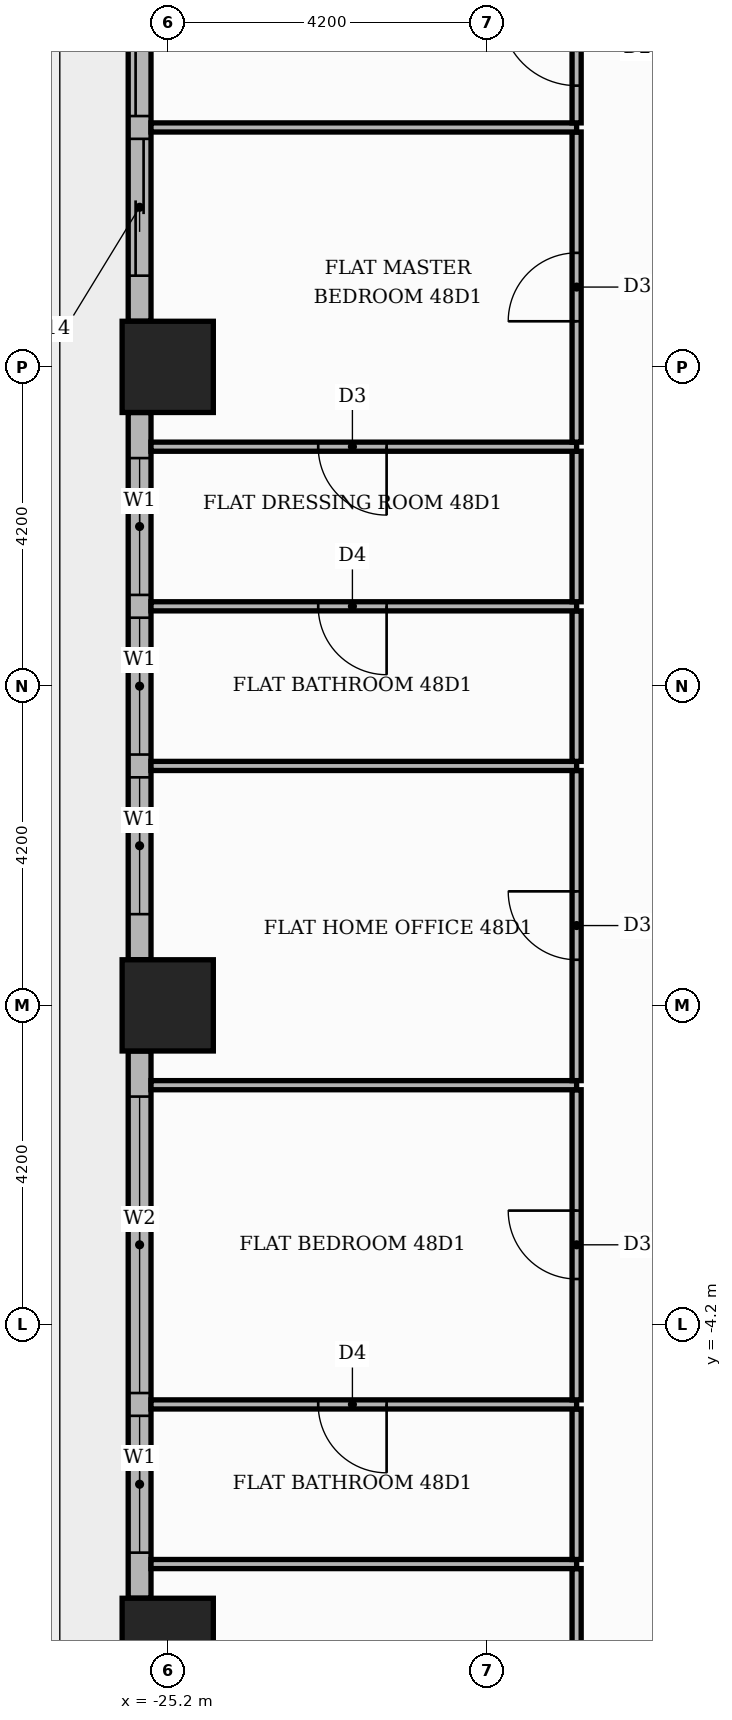
"""IFC4 building model, lengths in metres.
Left out: names, types, materials, properties, quantities, classifications, styles, units other than length and angle.
Written with IfcOpenShell. Run it as: python <this file> out.ifc"""

import sys

from ifc_helpers import new_model, si_unit, direction, frame, frame_2d, origin, origin_2d, place, context, subcontext, project, spatial, rectangle, extrude, element, fill, save


model = new_model("IFC4")
c1 = context("Model", 3, precision=1e-05, world=origin(), true_north=direction((0.0, 1.0)))
c2 = subcontext(c1, "Body", "Model", "MODEL_VIEW")
j1 = project(units=[si_unit("LENGTHUNIT", "METRE"), si_unit("PLANEANGLEUNIT", "RADIAN")], contexts=[c1])
p1 = place(None, origin())
s1 = spatial("IfcSite", under=j1, at=p1, CompositionType="ELEMENT")
p2 = place(p1, origin())
s2 = spatial("IfcBuilding", under=s1, at=p2, CompositionType="ELEMENT")
p3 = place(p2, frame((0.0, 0.0, 204.0)))
s3 = spatial("IfcBuildingStorey", under=s2, at=p3, CompositionType="ELEMENT", Elevation=204.0)
for number, where, z_axis, x_axis in (
    (1, (-25.2, 0.0, 0.0), (0.0, 0.0, 1.0), (1.0, 0.0, 0.0)),
    (2, (-25.2, -8.4, 0.0), (0.0, 0.0, 1.0), (1.0, 0.0, 0.0)),
    (3, (-25.2, 8.4, 0.0), (0.0, 0.0, 1.0), (1.0, 0.0, 0.0)),
):
    element("IfcColumn", number, at=place(p3, frame(where, z_axis=z_axis, x_axis=x_axis)), inside=s3, PredefinedType="COLUMN", context=c2, shape_type="SweptSolid", body=[
        extrude(rectangle(XDim=1.2, YDim=1.2, at=origin_2d()), origin(), (0.0, 0.0, 1.0), 3.9),
    ])
p4 = place(p3, frame((-25.57, 16.2, 0.0), z_axis=(0.0, 0.0, 1.0), x_axis=(0.0, -1.0, 0.0)))
e4 = element("IfcWall", 4, at=p4, inside=s3, PredefinedType="STANDARD", context=c2, shape_type="SweptSolid", body=[
    extrude(rectangle(XDim=7.2, YDim=0.3, at=frame_2d((3.6, 0.0))), origin(), (0.0, 0.0, 1.0), 3.48),
])
p5 = place(p4, frame((0.6, 0.0, 0.0)))
e5 = element("IfcOpeningElement", 5, at=p5, cuts=e4, PredefinedType="OPENING", context=c2, shape_type="SweptSolid", body=[
    extrude(rectangle(XDim=3.9, YDim=2.4, at=frame_2d((1.95, 1.2))), frame((0.0, 0.16, 0.0), z_axis=(0.0, -1.0, 0.0), x_axis=(1.0, 0.0, 0.0)), (0.0, 0.0, 1.0), 0.32),
])
p6 = place(p4, frame((4.8, 0.0, 0.0)))
e6 = element("IfcOpeningElement", 6, at=p6, cuts=e4, PredefinedType="OPENING", context=c2, shape_type="SweptSolid", body=[
    extrude(rectangle(XDim=1.8, YDim=2.4, at=frame_2d((0.9, 1.2))), frame((0.0, 0.16, 0.0), z_axis=(0.0, -1.0, 0.0), x_axis=(1.0, 0.0, 0.0)), (0.0, 0.0, 1.0), 0.32),
])
p7 = place(p3, frame((-25.57, 7.8, 0.0), z_axis=(0.0, 0.0, 1.0), x_axis=(0.0, -1.0, 0.0)))
e7 = element("IfcWall", 7, at=p7, inside=s3, PredefinedType="STANDARD", context=c2, shape_type="SweptSolid", body=[
    extrude(rectangle(XDim=7.2, YDim=0.3, at=frame_2d((3.6, 0.0))), origin(), (0.0, 0.0, 1.0), 3.48),
])
p8 = place(p7, frame((0.6, 0.0, 0.9)))
e8 = element("IfcOpeningElement", 8, at=p8, cuts=e7, PredefinedType="OPENING", context=c2, shape_type="SweptSolid", body=[
    extrude(rectangle(XDim=1.8, YDim=2.1, at=frame_2d((0.9, 1.05))), frame((0.0, 0.16, 0.0), z_axis=(0.0, -1.0, 0.0), x_axis=(1.0, 0.0, 0.0)), (0.0, 0.0, 1.0), 0.32),
])
p9 = place(p7, frame((2.7, 0.0, 0.9)))
e9 = element("IfcOpeningElement", 9, at=p9, cuts=e7, PredefinedType="OPENING", context=c2, shape_type="SweptSolid", body=[
    extrude(rectangle(XDim=1.8, YDim=2.1, at=frame_2d((0.9, 1.05))), frame((0.0, 0.16, 0.0), z_axis=(0.0, -1.0, 0.0), x_axis=(1.0, 0.0, 0.0)), (0.0, 0.0, 1.0), 0.32),
])
p10 = place(p7, frame((4.8, 0.0, 0.9)))
e10 = element("IfcOpeningElement", 10, at=p10, cuts=e7, PredefinedType="OPENING", context=c2, shape_type="SweptSolid", body=[
    extrude(rectangle(XDim=1.8, YDim=2.1, at=frame_2d((0.9, 1.05))), frame((0.0, 0.16, 0.0), z_axis=(0.0, -1.0, 0.0), x_axis=(1.0, 0.0, 0.0)), (0.0, 0.0, 1.0), 0.32),
])
p11 = place(p3, frame((-25.57, -0.6, 0.0), z_axis=(0.0, 0.0, 1.0), x_axis=(0.0, -1.0, 0.0)))
e11 = element("IfcWall", 11, at=p11, inside=s3, PredefinedType="STANDARD", context=c2, shape_type="SweptSolid", body=[
    extrude(rectangle(XDim=7.2, YDim=0.3, at=frame_2d((3.6, 0.0))), origin(), (0.0, 0.0, 1.0), 3.48),
])
p12 = place(p11, frame((0.6, 0.0, 0.9)))
e12 = element("IfcOpeningElement", 12, at=p12, cuts=e11, PredefinedType="OPENING", context=c2, shape_type="SweptSolid", body=[
    extrude(rectangle(XDim=3.9, YDim=2.1, at=frame_2d((1.95, 1.05))), frame((0.0, 0.16, 0.0), z_axis=(0.0, -1.0, 0.0), x_axis=(1.0, 0.0, 0.0)), (0.0, 0.0, 1.0), 0.32),
])
p13 = place(p11, frame((4.8, 0.0, 0.9)))
e13 = element("IfcOpeningElement", 13, at=p13, cuts=e11, PredefinedType="OPENING", context=c2, shape_type="SweptSolid", body=[
    extrude(rectangle(XDim=1.8, YDim=2.1, at=frame_2d((0.9, 1.05))), frame((0.0, 0.16, 0.0), z_axis=(0.0, -1.0, 0.0), x_axis=(1.0, 0.0, 0.0)), (0.0, 0.0, 1.0), 0.32),
])
p14 = place(p3, frame((-19.82, -11.49, 0.0), z_axis=(0.0, 0.0, 1.0), x_axis=(0.0, 1.0, 0.0)))
e14 = element("IfcWall", 14, at=p14, inside=s3, PredefinedType="PARTITIONING", context=c2, shape_type="SweptSolid", body=[
    extrude(rectangle(XDim=4.08, YDim=0.12, at=frame_2d((2.04, 0.0))), origin(), (0.0, 0.0, 1.0), 3.48),
])
p15 = place(p14, frame((1.59, 0.0, 0.0)))
e15 = element("IfcOpeningElement", 15, at=p15, cuts=e14, PredefinedType="OPENING", context=c2, shape_type="SweptSolid", body=[
    extrude(rectangle(XDim=0.9, YDim=2.1, at=frame_2d((0.45, 1.05))), frame((0.0, 0.07, 0.0), z_axis=(0.0, -1.0, 0.0), x_axis=(1.0, 0.0, 0.0)), (0.0, 0.0, 1.0), 0.14),
])
p16 = place(p3, frame((-25.42, -7.35, 0.0), z_axis=(0.0, 0.0, 1.0), x_axis=(1.0, 0.0, 0.0)))
e16 = element("IfcWall", 16, at=p16, inside=s3, PredefinedType="PARTITIONING", context=c2, shape_type="SweptSolid", body=[
    extrude(rectangle(XDim=5.6, YDim=0.12, at=frame_2d((2.8, 0.0))), origin(), (0.0, 0.0, 1.0), 3.48),
])
p17 = place(p3, frame((-19.82, -7.29, 0.0), z_axis=(0.0, 0.0, 1.0), x_axis=(0.0, 1.0, 0.0)))
e17 = element("IfcWall", 17, at=p17, inside=s3, PredefinedType="PARTITIONING", context=c2, shape_type="SweptSolid", body=[
    extrude(rectangle(XDim=1.98, YDim=0.12, at=frame_2d((0.99, 0.0))), origin(), (0.0, 0.0, 1.0), 3.48),
])
p18 = place(p3, frame((-25.42, -5.25, 0.0), z_axis=(0.0, 0.0, 1.0), x_axis=(1.0, 0.0, 0.0)))
e18 = element("IfcWall", 18, at=p18, inside=s3, PredefinedType="PARTITIONING", context=c2, shape_type="SweptSolid", body=[
    extrude(rectangle(XDim=5.6, YDim=0.12, at=frame_2d((2.8, 0.0))), origin(), (0.0, 0.0, 1.0), 3.48),
])
p19 = place(p18, frame((2.2, 0.0, 0.0)))
e19 = element("IfcOpeningElement", 19, at=p19, cuts=e18, PredefinedType="OPENING", context=c2, shape_type="SweptSolid", body=[
    extrude(rectangle(XDim=0.9, YDim=2.1, at=frame_2d((0.45, 1.05))), frame((0.0, 0.07, 0.0), z_axis=(0.0, -1.0, 0.0), x_axis=(1.0, 0.0, 0.0)), (0.0, 0.0, 1.0), 0.14),
])
p20 = place(p3, frame((-19.82, -5.19, 0.0), z_axis=(0.0, 0.0, 1.0), x_axis=(0.0, 1.0, 0.0)))
e20 = element("IfcWall", 20, at=p20, inside=s3, PredefinedType="PARTITIONING", context=c2, shape_type="SweptSolid", body=[
    extrude(rectangle(XDim=4.08, YDim=0.12, at=frame_2d((2.04, 0.0))), origin(), (0.0, 0.0, 1.0), 3.48),
])
p21 = place(p20, frame((1.59, 0.0, 0.0)))
e21 = element("IfcOpeningElement", 21, at=p21, cuts=e20, PredefinedType="OPENING", context=c2, shape_type="SweptSolid", body=[
    extrude(rectangle(XDim=0.9, YDim=2.1, at=frame_2d((0.45, 1.05))), frame((0.0, 0.07, 0.0), z_axis=(0.0, -1.0, 0.0), x_axis=(1.0, 0.0, 0.0)), (0.0, 0.0, 1.0), 0.14),
])
p22 = place(p3, frame((-25.42, -1.05, 0.0), z_axis=(0.0, 0.0, 1.0), x_axis=(1.0, 0.0, 0.0)))
e22 = element("IfcWall", 22, at=p22, inside=s3, PredefinedType="PARTITIONING", context=c2, shape_type="SweptSolid", body=[
    extrude(rectangle(XDim=5.6, YDim=0.12, at=frame_2d((2.8, 0.0))), origin(), (0.0, 0.0, 1.0), 3.48),
])
p23 = place(p3, frame((-19.82, -0.99, 0.0), z_axis=(0.0, 0.0, 1.0), x_axis=(0.0, 1.0, 0.0)))
e23 = element("IfcWall", 23, at=p23, inside=s3, PredefinedType="PARTITIONING", context=c2, shape_type="SweptSolid", body=[
    extrude(rectangle(XDim=4.08, YDim=0.12, at=frame_2d((2.04, 0.0))), origin(), (0.0, 0.0, 1.0), 3.48),
])
p24 = place(p23, frame((1.59, 0.0, 0.0)))
e24 = element("IfcOpeningElement", 24, at=p24, cuts=e23, PredefinedType="OPENING", context=c2, shape_type="SweptSolid", body=[
    extrude(rectangle(XDim=0.9, YDim=2.1, at=frame_2d((0.45, 1.05))), frame((0.0, 0.07, 0.0), z_axis=(0.0, -1.0, 0.0), x_axis=(1.0, 0.0, 0.0)), (0.0, 0.0, 1.0), 0.14),
])
p25 = place(p3, frame((-25.42, 3.15, 0.0), z_axis=(0.0, 0.0, 1.0), x_axis=(1.0, 0.0, 0.0)))
e25 = element("IfcWall", 25, at=p25, inside=s3, PredefinedType="PARTITIONING", context=c2, shape_type="SweptSolid", body=[
    extrude(rectangle(XDim=5.6, YDim=0.12, at=frame_2d((2.8, 0.0))), origin(), (0.0, 0.0, 1.0), 3.48),
])
p26 = place(p3, frame((-19.82, 3.21, 0.0), z_axis=(0.0, 0.0, 1.0), x_axis=(0.0, 1.0, 0.0)))
e26 = element("IfcWall", 26, at=p26, inside=s3, PredefinedType="PARTITIONING", context=c2, shape_type="SweptSolid", body=[
    extrude(rectangle(XDim=1.98, YDim=0.12, at=frame_2d((0.99, 0.0))), origin(), (0.0, 0.0, 1.0), 3.48),
])
p27 = place(p3, frame((-25.42, 5.25, 0.0), z_axis=(0.0, 0.0, 1.0), x_axis=(1.0, 0.0, 0.0)))
e27 = element("IfcWall", 27, at=p27, inside=s3, PredefinedType="PARTITIONING", context=c2, shape_type="SweptSolid", body=[
    extrude(rectangle(XDim=5.6, YDim=0.12, at=frame_2d((2.8, 0.0))), origin(), (0.0, 0.0, 1.0), 3.48),
])
p28 = place(p27, frame((2.2, 0.0, 0.0)))
e28 = element("IfcOpeningElement", 28, at=p28, cuts=e27, PredefinedType="OPENING", context=c2, shape_type="SweptSolid", body=[
    extrude(rectangle(XDim=0.9, YDim=2.1, at=frame_2d((0.45, 1.05))), frame((0.0, 0.07, 0.0), z_axis=(0.0, -1.0, 0.0), x_axis=(1.0, 0.0, 0.0)), (0.0, 0.0, 1.0), 0.14),
])
p29 = place(p3, frame((-19.82, 5.31, 0.0), z_axis=(0.0, 0.0, 1.0), x_axis=(0.0, 1.0, 0.0)))
e29 = element("IfcWall", 29, at=p29, inside=s3, PredefinedType="PARTITIONING", context=c2, shape_type="SweptSolid", body=[
    extrude(rectangle(XDim=1.98, YDim=0.12, at=frame_2d((0.99, 0.0))), origin(), (0.0, 0.0, 1.0), 3.48),
])
p30 = place(p3, frame((-25.42, 7.35, 0.0), z_axis=(0.0, 0.0, 1.0), x_axis=(1.0, 0.0, 0.0)))
e30 = element("IfcWall", 30, at=p30, inside=s3, PredefinedType="PARTITIONING", context=c2, shape_type="SweptSolid", body=[
    extrude(rectangle(XDim=5.6, YDim=0.12, at=frame_2d((2.8, 0.0))), origin(), (0.0, 0.0, 1.0), 3.48),
])
p31 = place(p30, frame((2.2, 0.0, 0.0)))
e31 = element("IfcOpeningElement", 31, at=p31, cuts=e30, PredefinedType="OPENING", context=c2, shape_type="SweptSolid", body=[
    extrude(rectangle(XDim=0.9, YDim=2.1, at=frame_2d((0.45, 1.05))), frame((0.0, 0.07, 0.0), z_axis=(0.0, -1.0, 0.0), x_axis=(1.0, 0.0, 0.0)), (0.0, 0.0, 1.0), 0.14),
])
p32 = place(p3, frame((-19.82, 7.41, 0.0), z_axis=(0.0, 0.0, 1.0), x_axis=(0.0, 1.0, 0.0)))
e32 = element("IfcWall", 32, at=p32, inside=s3, PredefinedType="PARTITIONING", context=c2, shape_type="SweptSolid", body=[
    extrude(rectangle(XDim=4.08, YDim=0.12, at=frame_2d((2.04, 0.0))), origin(), (0.0, 0.0, 1.0), 3.48),
])
p33 = place(p32, frame((1.59, 0.0, 0.0)))
e33 = element("IfcOpeningElement", 33, at=p33, cuts=e32, PredefinedType="OPENING", context=c2, shape_type="SweptSolid", body=[
    extrude(rectangle(XDim=0.9, YDim=2.1, at=frame_2d((0.45, 1.05))), frame((0.0, 0.07, 0.0), z_axis=(0.0, -1.0, 0.0), x_axis=(1.0, 0.0, 0.0)), (0.0, 0.0, 1.0), 0.14),
])
p34 = place(p3, frame((-25.42, 11.55, 0.0), z_axis=(0.0, 0.0, 1.0), x_axis=(1.0, 0.0, 0.0)))
e34 = element("IfcWall", 34, at=p34, inside=s3, PredefinedType="PARTITIONING", context=c2, shape_type="SweptSolid", body=[
    extrude(rectangle(XDim=5.6, YDim=0.12, at=frame_2d((2.8, 0.0))), origin(), (0.0, 0.0, 1.0), 3.48),
])
p35 = place(p3, frame((-19.82, 11.61, 0.0), z_axis=(0.0, 0.0, 1.0), x_axis=(0.0, 1.0, 0.0)))
e35 = element("IfcWall", 35, at=p35, inside=s3, PredefinedType="PARTITIONING", context=c2, shape_type="SweptSolid", body=[
    extrude(rectangle(XDim=1.98, YDim=0.12, at=frame_2d((0.99, 0.0))), origin(), (0.0, 0.0, 1.0), 3.48),
])
p36 = place(p35, frame((0.49, 0.0, 0.0)))
e36 = element("IfcOpeningElement", 36, at=p36, cuts=e35, PredefinedType="OPENING", context=c2, shape_type="SweptSolid", body=[
    extrude(rectangle(XDim=1.0, YDim=2.1, at=frame_2d((0.5, 1.05))), frame((0.0, 0.07, 0.0), z_axis=(0.0, -1.0, 0.0), x_axis=(1.0, 0.0, 0.0)), (0.0, 0.0, 1.0), 0.14),
])
p37 = place(p5, origin())
e37 = element("IfcDoor", 37, at=p37, inside=s3, OperationType="SLIDING_TO_LEFT", PredefinedType="DOOR", context=c2, shape_type="SweptSolid", body=[
    extrude(rectangle(XDim=3.9, YDim=2.4, at=frame_2d((1.95, 1.2))), frame((0.0, 0.025, 0.0), z_axis=(0.0, -1.0, 0.0), x_axis=(1.0, 0.0, 0.0)), (0.0, 0.0, 1.0), 0.05),
])
fill(e5, e37)
p38 = place(p6, origin())
e38 = element("IfcDoor", 38, at=p38, inside=s3, OperationType="SLIDING_TO_RIGHT", PredefinedType="DOOR", context=c2, shape_type="SweptSolid", body=[
    extrude(rectangle(XDim=1.8, YDim=2.4, at=frame_2d((0.9, 1.2))), frame((0.0, 0.025, 0.0), z_axis=(0.0, -1.0, 0.0), x_axis=(1.0, 0.0, 0.0)), (0.0, 0.0, 1.0), 0.05),
])
fill(e6, e38)
p39 = place(p8, origin())
e39 = element("IfcWindow", 39, at=p39, inside=s3, PartitioningType="SINGLE_PANEL", PredefinedType="WINDOW", context=c2, shape_type="SweptSolid", body=[
    extrude(rectangle(XDim=1.8, YDim=2.1, at=frame_2d((0.9, 1.05))), frame((0.0, 0.03, 0.0), z_axis=(0.0, -1.0, 0.0), x_axis=(1.0, 0.0, 0.0)), (0.0, 0.0, 1.0), 0.06),
])
fill(e8, e39)
p40 = place(p9, origin())
e40 = element("IfcWindow", 40, at=p40, inside=s3, PartitioningType="SINGLE_PANEL", PredefinedType="WINDOW", context=c2, shape_type="SweptSolid", body=[
    extrude(rectangle(XDim=1.8, YDim=2.1, at=frame_2d((0.9, 1.05))), frame((0.0, 0.03, 0.0), z_axis=(0.0, -1.0, 0.0), x_axis=(1.0, 0.0, 0.0)), (0.0, 0.0, 1.0), 0.06),
])
fill(e9, e40)
p41 = place(p10, origin())
e41 = element("IfcWindow", 41, at=p41, inside=s3, PartitioningType="SINGLE_PANEL", PredefinedType="WINDOW", context=c2, shape_type="SweptSolid", body=[
    extrude(rectangle(XDim=1.8, YDim=2.1, at=frame_2d((0.9, 1.05))), frame((0.0, 0.03, 0.0), z_axis=(0.0, -1.0, 0.0), x_axis=(1.0, 0.0, 0.0)), (0.0, 0.0, 1.0), 0.06),
])
fill(e10, e41)
p42 = place(p12, origin())
e42 = element("IfcWindow", 42, at=p42, inside=s3, PartitioningType="SINGLE_PANEL", PredefinedType="WINDOW", context=c2, shape_type="SweptSolid", body=[
    extrude(rectangle(XDim=3.9, YDim=2.1, at=frame_2d((1.95, 1.05))), frame((0.0, 0.03, 0.0), z_axis=(0.0, -1.0, 0.0), x_axis=(1.0, 0.0, 0.0)), (0.0, 0.0, 1.0), 0.06),
])
fill(e12, e42)
p43 = place(p13, origin())
e43 = element("IfcWindow", 43, at=p43, inside=s3, PartitioningType="SINGLE_PANEL", PredefinedType="WINDOW", context=c2, shape_type="SweptSolid", body=[
    extrude(rectangle(XDim=1.8, YDim=2.1, at=frame_2d((0.9, 1.05))), frame((0.0, 0.03, 0.0), z_axis=(0.0, -1.0, 0.0), x_axis=(1.0, 0.0, 0.0)), (0.0, 0.0, 1.0), 0.06),
])
fill(e13, e43)
p44 = place(p36, origin())
e44 = element("IfcDoor", 44, at=p44, inside=s3, OperationType="SINGLE_SWING_RIGHT", PredefinedType="DOOR", context=c2, shape_type="SweptSolid", body=[
    extrude(rectangle(XDim=1.0, YDim=2.1, at=frame_2d((0.5, 1.05))), frame((0.0, 0.025, 0.0), z_axis=(0.0, -1.0, 0.0), x_axis=(1.0, 0.0, 0.0)), (0.0, 0.0, 1.0), 0.05),
])
fill(e36, e44)
p45 = place(p33, origin())
e45 = element("IfcDoor", 45, at=p45, inside=s3, OperationType="SINGLE_SWING_LEFT", PredefinedType="DOOR", context=c2, shape_type="SweptSolid", body=[
    extrude(rectangle(XDim=0.9, YDim=2.1, at=frame_2d((0.45, 1.05))), frame((0.0, 0.025, 0.0), z_axis=(0.0, -1.0, 0.0), x_axis=(1.0, 0.0, 0.0)), (0.0, 0.0, 1.0), 0.05),
])
fill(e33, e45)
p46 = place(p31, frame((0.9, 0.0, 0.0), z_axis=(0.0, 0.0, 1.0), x_axis=(-1.0, 0.0, 0.0)))
e46 = element("IfcDoor", 46, at=p46, inside=s3, OperationType="SINGLE_SWING_RIGHT", PredefinedType="DOOR", context=c2, shape_type="SweptSolid", body=[
    extrude(rectangle(XDim=0.9, YDim=2.1, at=frame_2d((0.45, 1.05))), frame((0.0, 0.025, 0.0), z_axis=(0.0, -1.0, 0.0), x_axis=(1.0, 0.0, 0.0)), (0.0, 0.0, 1.0), 0.05),
])
fill(e31, e46)
p47 = place(p28, frame((0.9, 0.0, 0.0), z_axis=(0.0, 0.0, 1.0), x_axis=(-1.0, 0.0, 0.0)))
e47 = element("IfcDoor", 47, at=p47, inside=s3, OperationType="SINGLE_SWING_RIGHT", PredefinedType="DOOR", context=c2, shape_type="SweptSolid", body=[
    extrude(rectangle(XDim=0.9, YDim=2.1, at=frame_2d((0.45, 1.05))), frame((0.0, 0.025, 0.0), z_axis=(0.0, -1.0, 0.0), x_axis=(1.0, 0.0, 0.0)), (0.0, 0.0, 1.0), 0.05),
])
fill(e28, e47)
p48 = place(p24, origin())
e48 = element("IfcDoor", 48, at=p48, inside=s3, OperationType="SINGLE_SWING_RIGHT", PredefinedType="DOOR", context=c2, shape_type="SweptSolid", body=[
    extrude(rectangle(XDim=0.9, YDim=2.1, at=frame_2d((0.45, 1.05))), frame((0.0, 0.025, 0.0), z_axis=(0.0, -1.0, 0.0), x_axis=(1.0, 0.0, 0.0)), (0.0, 0.0, 1.0), 0.05),
])
fill(e24, e48)
p49 = place(p21, origin())
e49 = element("IfcDoor", 49, at=p49, inside=s3, OperationType="SINGLE_SWING_RIGHT", PredefinedType="DOOR", context=c2, shape_type="SweptSolid", body=[
    extrude(rectangle(XDim=0.9, YDim=2.1, at=frame_2d((0.45, 1.05))), frame((0.0, 0.025, 0.0), z_axis=(0.0, -1.0, 0.0), x_axis=(1.0, 0.0, 0.0)), (0.0, 0.0, 1.0), 0.05),
])
fill(e21, e49)
p50 = place(p19, frame((0.9, 0.0, 0.0), z_axis=(0.0, 0.0, 1.0), x_axis=(-1.0, 0.0, 0.0)))
e50 = element("IfcDoor", 50, at=p50, inside=s3, OperationType="SINGLE_SWING_RIGHT", PredefinedType="DOOR", context=c2, shape_type="SweptSolid", body=[
    extrude(rectangle(XDim=0.9, YDim=2.1, at=frame_2d((0.45, 1.05))), frame((0.0, 0.025, 0.0), z_axis=(0.0, -1.0, 0.0), x_axis=(1.0, 0.0, 0.0)), (0.0, 0.0, 1.0), 0.05),
])
fill(e19, e50)
save(model, sys.argv[1])
